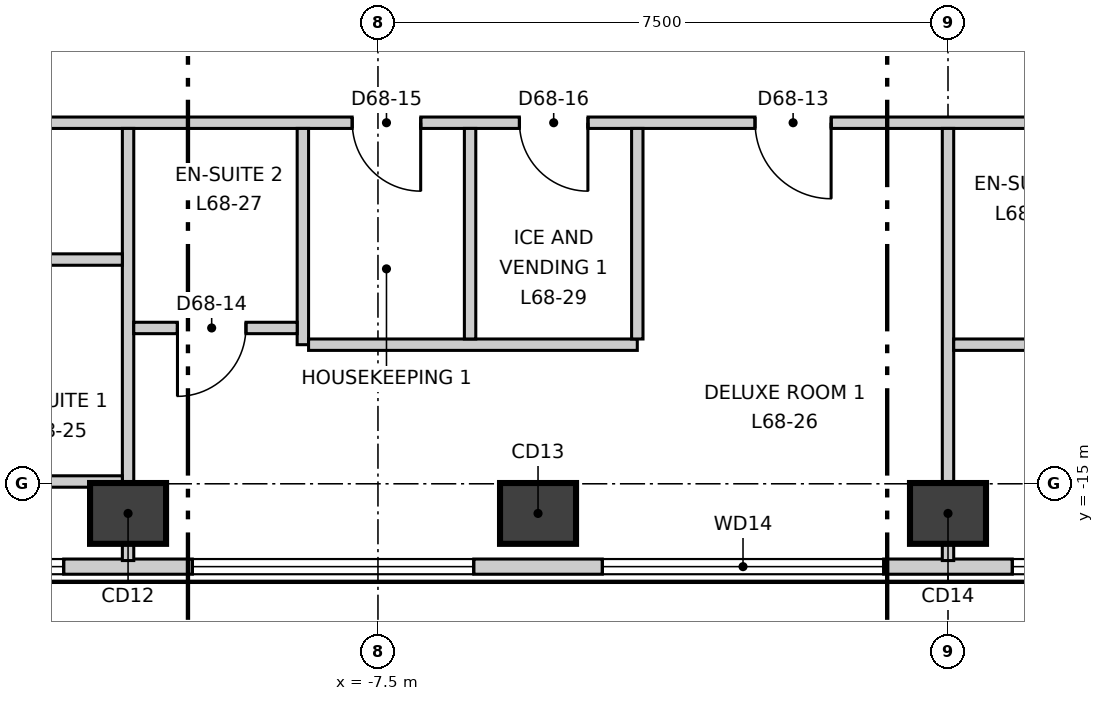
"""IFC4 building model, lengths in metres.
Left out: names, types, materials, properties, quantities, classifications, styles, units other than length and angle.
Written with IfcOpenShell. Run it as: python <this file> out.ifc"""

import sys

from ifc_helpers import new_model, si_unit, direction, frame, frame_2d, origin, origin_2d, place, context, subcontext, project, spatial, rectangle, extrude, element, fill, save


model = new_model("IFC4")
c1 = context("Model", 3, precision=1e-05, world=origin(), true_north=direction((0.0, 1.0)))
c2 = subcontext(c1, "Body", "Model", "MODEL_VIEW")
j1 = project(units=[si_unit("LENGTHUNIT", "METRE"), si_unit("PLANEANGLEUNIT", "RADIAN")], contexts=[c1])
p1 = place(None, origin())
s1 = spatial("IfcSite", under=j1, at=p1, CompositionType="ELEMENT")
p2 = place(p1, origin())
s2 = spatial("IfcBuilding", under=s1, at=p2, CompositionType="ELEMENT")
p3 = place(p2, frame((0.0, 0.0, 289.9)))
s3 = spatial("IfcBuildingStorey", under=s2, at=p3, CompositionType="ELEMENT", Elevation=289.9)
for number, where, z_axis, x_axis in (
    (1, (-10.788, -15.39, -0.3), (0.0, 0.0, 1.0), (1.0, 0.0, 0.0)),
    (2, (-5.394, -15.39, -0.3), (0.0, 0.0, 1.0), (1.0, 0.0, 0.0)),
    (3, (0.0, -15.39, -0.3), (0.0, 0.0, 1.0), (1.0, 0.0, 0.0)),
):
    element("IfcColumn", number, at=place(p3, frame(where, z_axis=z_axis, x_axis=x_axis)), inside=s3, PredefinedType="COLUMN", context=c2, shape_type="SweptSolid", body=[
        extrude(rectangle(XDim=1.0, YDim=0.8, at=origin_2d()), origin(), (0.0, 0.0, 1.0), 3.6),
    ])
p4 = place(p3, frame((-2.494, 27.86, 0.0), z_axis=(0.0, 0.0, 1.0), x_axis=(-0.500008134474, -0.866020707292, 0.0)))
e4 = element("IfcWall", 4, at=p4, inside=s3, PredefinedType="ELEMENTEDWALL", context=c2, shape_type="SweptSolid", body=[
    extrude(rectangle(XDim=45.741, YDim=0.2, at=frame_2d((22.871, 0.0))), origin(), (0.0, 0.0, 1.0), 3.3),
])
p5 = place(p4, frame((2.15, 0.0, 0.9)))
e5 = element("IfcOpeningElement", 5, at=p5, cuts=e4, PredefinedType="OPENING", context=c2, shape_type="SweptSolid", body=[
    extrude(rectangle(XDim=3.7, YDim=2.2, at=frame_2d((1.85, 1.1))), frame((0.0, 0.11, 0.0), z_axis=(0.0, -1.0, 0.0), x_axis=(1.0, 0.0, 0.0)), (0.0, 0.0, 1.0), 0.22),
])
p6 = place(p4, frame((7.544, 0.0, 0.9)))
e6 = element("IfcOpeningElement", 6, at=p6, cuts=e4, PredefinedType="OPENING", context=c2, shape_type="SweptSolid", body=[
    extrude(rectangle(XDim=3.7, YDim=2.2, at=frame_2d((1.85, 1.1))), frame((0.0, 0.11, 0.0), z_axis=(0.0, -1.0, 0.0), x_axis=(1.0, 0.0, 0.0)), (0.0, 0.0, 1.0), 0.22),
])
p7 = place(p4, frame((12.939, 0.0, 0.9)))
e7 = element("IfcOpeningElement", 7, at=p7, cuts=e4, PredefinedType="OPENING", context=c2, shape_type="SweptSolid", body=[
    extrude(rectangle(XDim=3.7, YDim=2.2, at=frame_2d((1.85, 1.1))), frame((0.0, 0.11, 0.0), z_axis=(0.0, -1.0, 0.0), x_axis=(1.0, 0.0, 0.0)), (0.0, 0.0, 1.0), 0.22),
])
p8 = place(p4, frame((18.333, 0.0, 0.9)))
e8 = element("IfcOpeningElement", 8, at=p8, cuts=e4, PredefinedType="OPENING", context=c2, shape_type="SweptSolid", body=[
    extrude(rectangle(XDim=3.7, YDim=2.2, at=frame_2d((1.85, 1.1))), frame((0.0, 0.11, 0.0), z_axis=(0.0, -1.0, 0.0), x_axis=(1.0, 0.0, 0.0)), (0.0, 0.0, 1.0), 0.22),
])
p9 = place(p4, frame((23.728, 0.0, 0.9)))
e9 = element("IfcOpeningElement", 9, at=p9, cuts=e4, PredefinedType="OPENING", context=c2, shape_type="SweptSolid", body=[
    extrude(rectangle(XDim=3.7, YDim=2.2, at=frame_2d((1.85, 1.1))), frame((0.0, 0.11, 0.0), z_axis=(0.0, -1.0, 0.0), x_axis=(1.0, 0.0, 0.0)), (0.0, 0.0, 1.0), 0.22),
])
p10 = place(p4, frame((29.122, 0.0, 0.9)))
e10 = element("IfcOpeningElement", 10, at=p10, cuts=e4, PredefinedType="OPENING", context=c2, shape_type="SweptSolid", body=[
    extrude(rectangle(XDim=3.7, YDim=2.2, at=frame_2d((1.85, 1.1))), frame((0.0, 0.11, 0.0), z_axis=(0.0, -1.0, 0.0), x_axis=(1.0, 0.0, 0.0)), (0.0, 0.0, 1.0), 0.22),
])
p11 = place(p4, frame((34.517, 0.0, 0.9)))
e11 = element("IfcOpeningElement", 11, at=p11, cuts=e4, PredefinedType="OPENING", context=c2, shape_type="SweptSolid", body=[
    extrude(rectangle(XDim=3.7, YDim=2.2, at=frame_2d((1.85, 1.1))), frame((0.0, 0.11, 0.0), z_axis=(0.0, -1.0, 0.0), x_axis=(1.0, 0.0, 0.0)), (0.0, 0.0, 1.0), 0.22),
])
p12 = place(p4, frame((39.911, 0.0, 0.9)))
e12 = element("IfcOpeningElement", 12, at=p12, cuts=e4, PredefinedType="OPENING", context=c2, shape_type="SweptSolid", body=[
    extrude(rectangle(XDim=3.7, YDim=2.2, at=frame_2d((1.85, 1.1))), frame((0.0, 0.11, 0.0), z_axis=(0.0, -1.0, 0.0), x_axis=(1.0, 0.0, 0.0)), (0.0, 0.0, 1.0), 0.22),
])
p13 = place(p3, frame((-22.88, -16.09, 0.0), z_axis=(0.0, 0.0, 1.0), x_axis=(1.0, 0.0, 0.0)))
e13 = element("IfcWall", 13, at=p13, inside=s3, PredefinedType="ELEMENTEDWALL", context=c2, shape_type="SweptSolid", body=[
    extrude(rectangle(XDim=45.74, YDim=0.2, at=frame_2d((22.87, 0.0))), origin(), (0.0, 0.0, 1.0), 3.3),
])
p14 = place(p13, frame((2.15, 0.0, 0.9)))
e14 = element("IfcOpeningElement", 14, at=p14, cuts=e13, PredefinedType="OPENING", context=c2, shape_type="SweptSolid", body=[
    extrude(rectangle(XDim=3.7, YDim=2.2, at=frame_2d((1.85, 1.1))), frame((0.0, 0.11, 0.0), z_axis=(0.0, -1.0, 0.0), x_axis=(1.0, 0.0, 0.0)), (0.0, 0.0, 1.0), 0.22),
])
p15 = place(p13, frame((7.544, 0.0, 0.9)))
e15 = element("IfcOpeningElement", 15, at=p15, cuts=e13, PredefinedType="OPENING", context=c2, shape_type="SweptSolid", body=[
    extrude(rectangle(XDim=3.7, YDim=2.2, at=frame_2d((1.85, 1.1))), frame((0.0, 0.11, 0.0), z_axis=(0.0, -1.0, 0.0), x_axis=(1.0, 0.0, 0.0)), (0.0, 0.0, 1.0), 0.22),
])
p16 = place(p13, frame((12.939, 0.0, 0.9)))
e16 = element("IfcOpeningElement", 16, at=p16, cuts=e13, PredefinedType="OPENING", context=c2, shape_type="SweptSolid", body=[
    extrude(rectangle(XDim=3.7, YDim=2.2, at=frame_2d((1.85, 1.1))), frame((0.0, 0.11, 0.0), z_axis=(0.0, -1.0, 0.0), x_axis=(1.0, 0.0, 0.0)), (0.0, 0.0, 1.0), 0.22),
])
p17 = place(p13, frame((18.333, 0.0, 0.9)))
e17 = element("IfcOpeningElement", 17, at=p17, cuts=e13, PredefinedType="OPENING", context=c2, shape_type="SweptSolid", body=[
    extrude(rectangle(XDim=3.7, YDim=2.2, at=frame_2d((1.85, 1.1))), frame((0.0, 0.11, 0.0), z_axis=(0.0, -1.0, 0.0), x_axis=(1.0, 0.0, 0.0)), (0.0, 0.0, 1.0), 0.22),
])
p18 = place(p13, frame((23.727, 0.0, 0.9)))
e18 = element("IfcOpeningElement", 18, at=p18, cuts=e13, PredefinedType="OPENING", context=c2, shape_type="SweptSolid", body=[
    extrude(rectangle(XDim=3.7, YDim=2.2, at=frame_2d((1.85, 1.1))), frame((0.0, 0.11, 0.0), z_axis=(0.0, -1.0, 0.0), x_axis=(1.0, 0.0, 0.0)), (0.0, 0.0, 1.0), 0.22),
])
p19 = place(p13, frame((29.121, 0.0, 0.9)))
e19 = element("IfcOpeningElement", 19, at=p19, cuts=e13, PredefinedType="OPENING", context=c2, shape_type="SweptSolid", body=[
    extrude(rectangle(XDim=3.7, YDim=2.2, at=frame_2d((1.85, 1.1))), frame((0.0, 0.11, 0.0), z_axis=(0.0, -1.0, 0.0), x_axis=(1.0, 0.0, 0.0)), (0.0, 0.0, 1.0), 0.22),
])
p20 = place(p13, frame((34.516, 0.0, 0.9)))
e20 = element("IfcOpeningElement", 20, at=p20, cuts=e13, PredefinedType="OPENING", context=c2, shape_type="SweptSolid", body=[
    extrude(rectangle(XDim=3.7, YDim=2.2, at=frame_2d((1.85, 1.1))), frame((0.0, 0.11, 0.0), z_axis=(0.0, -1.0, 0.0), x_axis=(1.0, 0.0, 0.0)), (0.0, 0.0, 1.0), 0.22),
])
p21 = place(p13, frame((39.91, 0.0, 0.9)))
e21 = element("IfcOpeningElement", 21, at=p21, cuts=e13, PredefinedType="OPENING", context=c2, shape_type="SweptSolid", body=[
    extrude(rectangle(XDim=3.7, YDim=2.2, at=frame_2d((1.85, 1.1))), frame((0.0, 0.11, 0.0), z_axis=(0.0, -1.0, 0.0), x_axis=(1.0, 0.0, 0.0)), (0.0, 0.0, 1.0), 0.22),
])
p22 = place(p3, frame((-17.603, -10.25, 0.0), z_axis=(0.0, 0.0, 1.0), x_axis=(1.0, 0.0, 0.0)))
e22 = element("IfcWall", 22, at=p22, inside=s3, PredefinedType="PARTITIONING", context=c2, shape_type="SweptSolid", body=[
    extrude(rectangle(XDim=35.356, YDim=0.15, at=frame_2d((17.678, 0.0))), origin(), (0.0, 0.0, 1.0), 3.3),
])
p23 = place(p22, frame((2.8, 0.0, 0.0)))
e23 = element("IfcOpeningElement", 23, at=p23, cuts=e22, PredefinedType="OPENING", context=c2, shape_type="SweptSolid", body=[
    extrude(rectangle(XDim=1.0, YDim=2.1, at=frame_2d((0.5, 1.05))), frame((0.0, 0.085, 0.0), z_axis=(0.0, -1.0, 0.0), x_axis=(1.0, 0.0, 0.0)), (0.0, 0.0, 1.0), 0.17),
])
p24 = place(p22, frame((15.065, 0.0, 0.0)))
e24 = element("IfcOpeningElement", 24, at=p24, cuts=e22, PredefinedType="OPENING", context=c2, shape_type="SweptSolid", body=[
    extrude(rectangle(XDim=1.0, YDim=2.1, at=frame_2d((0.5, 1.05))), frame((0.0, 0.085, 0.0), z_axis=(0.0, -1.0, 0.0), x_axis=(1.0, 0.0, 0.0)), (0.0, 0.0, 1.0), 0.17),
])
p25 = place(p22, frame((9.765, 0.0, 0.0)))
e25 = element("IfcOpeningElement", 25, at=p25, cuts=e22, PredefinedType="OPENING", context=c2, shape_type="SweptSolid", body=[
    extrude(rectangle(XDim=0.9, YDim=2.1, at=frame_2d((0.45, 1.05))), frame((0.0, 0.085, 0.0), z_axis=(0.0, -1.0, 0.0), x_axis=(1.0, 0.0, 0.0)), (0.0, 0.0, 1.0), 0.17),
])
p26 = place(p22, frame((11.965, 0.0, 0.0)))
e26 = element("IfcOpeningElement", 26, at=p26, cuts=e22, PredefinedType="OPENING", context=c2, shape_type="SweptSolid", body=[
    extrude(rectangle(XDim=0.9, YDim=2.1, at=frame_2d((0.45, 1.05))), frame((0.0, 0.085, 0.0), z_axis=(0.0, -1.0, 0.0), x_axis=(1.0, 0.0, 0.0)), (0.0, 0.0, 1.0), 0.17),
])
p27 = place(p22, frame((20.953, 0.0, 0.0)))
e27 = element("IfcOpeningElement", 27, at=p27, cuts=e22, PredefinedType="OPENING", context=c2, shape_type="SweptSolid", body=[
    extrude(rectangle(XDim=1.0, YDim=2.1, at=frame_2d((0.5, 1.05))), frame((0.0, 0.085, 0.0), z_axis=(0.0, -1.0, 0.0), x_axis=(1.0, 0.0, 0.0)), (0.0, 0.0, 1.0), 0.17),
])
p28 = place(p22, frame((26.347, 0.0, 0.0)))
e28 = element("IfcOpeningElement", 28, at=p28, cuts=e22, PredefinedType="OPENING", context=c2, shape_type="SweptSolid", body=[
    extrude(rectangle(XDim=1.0, YDim=2.1, at=frame_2d((0.5, 1.05))), frame((0.0, 0.085, 0.0), z_axis=(0.0, -1.0, 0.0), x_axis=(1.0, 0.0, 0.0)), (0.0, 0.0, 1.0), 0.17),
])
p29 = place(p22, frame((31.342, 0.0, 0.0)))
e29 = element("IfcOpeningElement", 29, at=p29, cuts=e22, PredefinedType="OPENING", context=c2, shape_type="SweptSolid", body=[
    extrude(rectangle(XDim=1.0, YDim=2.1, at=frame_2d((0.5, 1.05))), frame((0.0, 0.085, 0.0), z_axis=(0.0, -1.0, 0.0), x_axis=(1.0, 0.0, 0.0)), (0.0, 0.0, 1.0), 0.17),
])
p30 = place(p3, frame((-17.679, -10.12, 0.0), z_axis=(0.0, 0.0, 1.0), x_axis=(0.500008955215, 0.866020233427, 0.0)))
e30 = element("IfcWall", 30, at=p30, inside=s3, PredefinedType="PARTITIONING", context=c2, shape_type="SweptSolid", body=[
    extrude(rectangle(XDim=35.357, YDim=0.15, at=frame_2d((17.679, 0.0))), origin(), (0.0, 0.0, 1.0), 3.3),
])
p31 = place(p30, frame((31.407, 0.0, 0.0)))
e31 = element("IfcOpeningElement", 31, at=p31, cuts=e30, PredefinedType="OPENING", context=c2, shape_type="SweptSolid", body=[
    extrude(rectangle(XDim=1.0, YDim=2.1, at=frame_2d((0.5, 1.05))), frame((0.0, 0.085, 0.0), z_axis=(0.0, -1.0, 0.0), x_axis=(1.0, 0.0, 0.0)), (0.0, 0.0, 1.0), 0.17),
])
p32 = place(p30, frame((25.642, 0.0, 0.0)))
e32 = element("IfcOpeningElement", 32, at=p32, cuts=e30, PredefinedType="OPENING", context=c2, shape_type="SweptSolid", body=[
    extrude(rectangle(XDim=1.0, YDim=2.1, at=frame_2d((0.5, 1.05))), frame((0.0, 0.085, 0.0), z_axis=(0.0, -1.0, 0.0), x_axis=(1.0, 0.0, 0.0)), (0.0, 0.0, 1.0), 0.17),
])
p33 = place(p30, frame((18.348, 0.0, 0.0)))
e33 = element("IfcOpeningElement", 33, at=p33, cuts=e30, PredefinedType="OPENING", context=c2, shape_type="SweptSolid", body=[
    extrude(rectangle(XDim=1.0, YDim=2.1, at=frame_2d((0.5, 1.05))), frame((0.0, 0.085, 0.0), z_axis=(0.0, -1.0, 0.0), x_axis=(1.0, 0.0, 0.0)), (0.0, 0.0, 1.0), 0.17),
])
p34 = place(p30, frame((13.254, 0.0, 0.0)))
e34 = element("IfcOpeningElement", 34, at=p34, cuts=e30, PredefinedType="OPENING", context=c2, shape_type="SweptSolid", body=[
    extrude(rectangle(XDim=1.0, YDim=2.1, at=frame_2d((0.5, 1.05))), frame((0.0, 0.085, 0.0), z_axis=(0.0, -1.0, 0.0), x_axis=(1.0, 0.0, 0.0)), (0.0, 0.0, 1.0), 0.17),
])
p35 = place(p30, frame((7.559, 0.0, 0.0)))
e35 = element("IfcOpeningElement", 35, at=p35, cuts=e30, PredefinedType="OPENING", context=c2, shape_type="SweptSolid", body=[
    extrude(rectangle(XDim=1.0, YDim=2.1, at=frame_2d((0.5, 1.05))), frame((0.0, 0.085, 0.0), z_axis=(0.0, -1.0, 0.0), x_axis=(1.0, 0.0, 0.0)), (0.0, 0.0, 1.0), 0.17),
])
p36 = place(p30, frame((2.865, 0.0, 0.0)))
e36 = element("IfcOpeningElement", 36, at=p36, cuts=e30, PredefinedType="OPENING", context=c2, shape_type="SweptSolid", body=[
    extrude(rectangle(XDim=1.0, YDim=2.1, at=frame_2d((0.5, 1.05))), frame((0.0, 0.085, 0.0), z_axis=(0.0, -1.0, 0.0), x_axis=(1.0, 0.0, 0.0)), (0.0, 0.0, 1.0), 0.17),
])
p37 = place(p3, frame((-10.788, -16.01, 0.0), z_axis=(0.0, 0.0, 1.0), x_axis=(0.0, 1.0, 0.0)))
e37 = element("IfcWall", 37, at=p37, inside=s3, PredefinedType="PARTITIONING", context=c2, shape_type="SweptSolid", body=[
    extrude(rectangle(XDim=5.685, YDim=0.15, at=frame_2d((2.843, 0.0))), origin(), (0.0, 0.0, 1.0), 3.3),
])
p38 = place(p3, frame((-8.488, -13.17, 0.0), z_axis=(0.0, 0.0, 1.0), x_axis=(0.0, 1.0, 0.0)))
e38 = element("IfcWall", 38, at=p38, inside=s3, PredefinedType="PARTITIONING", context=c2, shape_type="SweptSolid", body=[
    extrude(rectangle(XDim=2.845, YDim=0.15, at=frame_2d((1.422, 0.0))), origin(), (0.0, 0.0, 1.0), 3.3),
])
p39 = place(p3, frame((-8.413, -13.17, 0.0), z_axis=(0.0, 0.0, 1.0), x_axis=(1.0, 0.0, 0.0)))
e39 = element("IfcWall", 39, at=p39, inside=s3, PredefinedType="PARTITIONING", context=c2, shape_type="SweptSolid", body=[
    extrude(rectangle(XDim=4.325, YDim=0.15, at=frame_2d((2.163, 0.0))), origin(), (0.0, 0.0, 1.0), 3.3),
])
for number, where, z_axis, x_axis in (
    (40, (-4.088, -13.095, 0.0), (0.0, 0.0, 1.0), (0.0, 1.0, 0.0)),
    (41, (-6.288, -13.095, 0.0), (0.0, 0.0, 1.0), (0.0, 1.0, 0.0)),
):
    element("IfcWall", number, at=place(p3, frame(where, z_axis=z_axis, x_axis=x_axis)), inside=s3, PredefinedType="PARTITIONING", context=c2, shape_type="SweptSolid", body=[
        extrude(rectangle(XDim=2.77, YDim=0.15, at=frame_2d((1.385, 0.0))), origin(), (0.0, 0.0, 1.0), 3.3),
    ])
p40 = place(p3, frame((0.0, -16.01, 0.0), z_axis=(0.0, 0.0, 1.0), x_axis=(0.0, 1.0, 0.0)))
e42 = element("IfcWall", 42, at=p40, inside=s3, PredefinedType="PARTITIONING", context=c2, shape_type="SweptSolid", body=[
    extrude(rectangle(XDim=5.685, YDim=0.15, at=frame_2d((2.843, 0.0))), origin(), (0.0, 0.0, 1.0), 2.8),
])
p41 = place(p3, frame((0.075, 20.37, 0.0), z_axis=(0.0, 0.0, 1.0), x_axis=(0.500009775255, -0.866019759965, 0.0)))
e43 = element("IfcWall", 43, at=p41, inside=s3, PredefinedType="PARTITIONING", context=c2, shape_type="SweptSolid", body=[
    extrude(rectangle(XDim=35.207, YDim=0.15, at=frame_2d((17.604, 0.0))), origin(), (0.0, 0.0, 1.0), 3.3),
])
p42 = place(p41, frame((31.407, 0.0, 0.0)))
e44 = element("IfcOpeningElement", 44, at=p42, cuts=e43, PredefinedType="OPENING", context=c2, shape_type="SweptSolid", body=[
    extrude(rectangle(XDim=1.0, YDim=2.1, at=frame_2d((0.5, 1.05))), frame((0.0, 0.085, 0.0), z_axis=(0.0, -1.0, 0.0), x_axis=(1.0, 0.0, 0.0)), (0.0, 0.0, 1.0), 0.17),
])
p43 = place(p41, frame((19.243, 0.0, 0.0)))
e45 = element("IfcOpeningElement", 45, at=p43, cuts=e43, PredefinedType="OPENING", context=c2, shape_type="SweptSolid", body=[
    extrude(rectangle(XDim=1.0, YDim=2.1, at=frame_2d((0.5, 1.05))), frame((0.0, 0.085, 0.0), z_axis=(0.0, -1.0, 0.0), x_axis=(1.0, 0.0, 0.0)), (0.0, 0.0, 1.0), 0.17),
])
p44 = place(p41, frame((24.543, 0.0, 0.0)))
e46 = element("IfcOpeningElement", 46, at=p44, cuts=e43, PredefinedType="OPENING", context=c2, shape_type="SweptSolid", body=[
    extrude(rectangle(XDim=0.9, YDim=2.1, at=frame_2d((0.45, 1.05))), frame((0.0, 0.085, 0.0), z_axis=(0.0, -1.0, 0.0), x_axis=(1.0, 0.0, 0.0)), (0.0, 0.0, 1.0), 0.17),
])
p45 = place(p41, frame((22.443, 0.0, 0.0)))
e47 = element("IfcOpeningElement", 47, at=p45, cuts=e43, PredefinedType="OPENING", context=c2, shape_type="SweptSolid", body=[
    extrude(rectangle(XDim=0.9, YDim=2.1, at=frame_2d((0.45, 1.05))), frame((0.0, 0.085, 0.0), z_axis=(0.0, -1.0, 0.0), x_axis=(1.0, 0.0, 0.0)), (0.0, 0.0, 1.0), 0.17),
])
p46 = place(p41, frame((13.253, 0.0, 0.0)))
e48 = element("IfcOpeningElement", 48, at=p46, cuts=e43, PredefinedType="OPENING", context=c2, shape_type="SweptSolid", body=[
    extrude(rectangle(XDim=1.0, YDim=2.1, at=frame_2d((0.5, 1.05))), frame((0.0, 0.085, 0.0), z_axis=(0.0, -1.0, 0.0), x_axis=(1.0, 0.0, 0.0)), (0.0, 0.0, 1.0), 0.17),
])
p47 = place(p41, frame((5.559, 0.0, 0.0)))
e49 = element("IfcOpeningElement", 49, at=p47, cuts=e43, PredefinedType="OPENING", context=c2, shape_type="SweptSolid", body=[
    extrude(rectangle(XDim=1.0, YDim=2.1, at=frame_2d((0.5, 1.05))), frame((0.0, 0.085, 0.0), z_axis=(0.0, -1.0, 0.0), x_axis=(1.0, 0.0, 0.0)), (0.0, 0.0, 1.0), 0.17),
])
p48 = place(p3, frame((-13.388, -12.05, 0.0), z_axis=(0.0, 0.0, 1.0), x_axis=(1.0, 0.0, 0.0)))
e50 = element("IfcWall", 50, at=p48, inside=s3, PredefinedType="PARTITIONING", context=c2, shape_type="SweptSolid", body=[
    extrude(rectangle(XDim=2.525, YDim=0.15, at=frame_2d((1.262, 0.0))), origin(), (0.0, 0.0, 1.0), 3.3),
])
p49 = place(p3, frame((-13.313, -14.97, 0.0), z_axis=(0.0, 0.0, 1.0), x_axis=(1.0, 0.0, 0.0)))
e51 = element("IfcWall", 51, at=p49, inside=s3, PredefinedType="PARTITIONING", context=c2, shape_type="SweptSolid", body=[
    extrude(rectangle(XDim=2.45, YDim=0.15, at=frame_2d((1.225, 0.0))), origin(), (0.0, 0.0, 1.0), 2.6),
])
p50 = place(p3, frame((-10.713, -12.95, 0.0), z_axis=(0.0, 0.0, 1.0), x_axis=(1.0, 0.0, 0.0)))
e52 = element("IfcWall", 52, at=p50, inside=s3, PredefinedType="PARTITIONING", context=c2, shape_type="SweptSolid", body=[
    extrude(rectangle(XDim=2.15, YDim=0.15, at=frame_2d((1.075, 0.0))), origin(), (0.0, 0.0, 1.0), 3.3),
])
p51 = place(p50, frame((0.575, 0.0, 0.0)))
e53 = element("IfcOpeningElement", 53, at=p51, cuts=e52, PredefinedType="OPENING", context=c2, shape_type="SweptSolid", body=[
    extrude(rectangle(XDim=0.9, YDim=2.1, at=frame_2d((0.45, 1.05))), frame((0.0, 0.085, 0.0), z_axis=(0.0, -1.0, 0.0), x_axis=(1.0, 0.0, 0.0)), (0.0, 0.0, 1.0), 0.17),
])
p52 = place(p3, frame((0.075, -13.17, 0.0), z_axis=(0.0, 0.0, 1.0), x_axis=(1.0, 0.0, 0.0)))
e54 = element("IfcWall", 54, at=p52, inside=s3, PredefinedType="PARTITIONING", context=c2, shape_type="SweptSolid", body=[
    extrude(rectangle(XDim=2.925, YDim=0.15, at=frame_2d((1.462, 0.0))), origin(), (0.0, 0.0, 1.0), 3.3),
])
p53 = place(p52, frame((0.975, 0.0, 0.0)))
e55 = element("IfcOpeningElement", 55, at=p53, cuts=e54, PredefinedType="OPENING", context=c2, shape_type="SweptSolid", body=[
    extrude(rectangle(XDim=0.9, YDim=2.1, at=frame_2d((0.45, 1.05))), frame((0.0, 0.085, 0.0), z_axis=(0.0, -1.0, 0.0), x_axis=(1.0, 0.0, 0.0)), (0.0, 0.0, 1.0), 0.17),
])
p54 = place(p15, origin())
e56 = element("IfcWindow", 56, at=p54, inside=s3, PartitioningType="SINGLE_PANEL", PredefinedType="WINDOW", context=c2, shape_type="SweptSolid", body=[
    extrude(rectangle(XDim=3.7, YDim=2.2, at=frame_2d((1.85, 1.1))), frame((0.0, 0.03, 0.0), z_axis=(0.0, -1.0, 0.0), x_axis=(1.0, 0.0, 0.0)), (0.0, 0.0, 1.0), 0.06),
])
fill(e15, e56)
p55 = place(p16, origin())
e57 = element("IfcWindow", 57, at=p55, inside=s3, PartitioningType="SINGLE_PANEL", PredefinedType="WINDOW", context=c2, shape_type="SweptSolid", body=[
    extrude(rectangle(XDim=3.7, YDim=2.2, at=frame_2d((1.85, 1.1))), frame((0.0, 0.03, 0.0), z_axis=(0.0, -1.0, 0.0), x_axis=(1.0, 0.0, 0.0)), (0.0, 0.0, 1.0), 0.06),
])
fill(e16, e57)
p56 = place(p17, origin())
e58 = element("IfcWindow", 58, at=p56, inside=s3, PartitioningType="SINGLE_PANEL", PredefinedType="WINDOW", context=c2, shape_type="SweptSolid", body=[
    extrude(rectangle(XDim=3.7, YDim=2.2, at=frame_2d((1.85, 1.1))), frame((0.0, 0.03, 0.0), z_axis=(0.0, -1.0, 0.0), x_axis=(1.0, 0.0, 0.0)), (0.0, 0.0, 1.0), 0.06),
])
fill(e17, e58)
p57 = place(p18, origin())
e59 = element("IfcWindow", 59, at=p57, inside=s3, PartitioningType="SINGLE_PANEL", PredefinedType="WINDOW", context=c2, shape_type="SweptSolid", body=[
    extrude(rectangle(XDim=3.7, YDim=2.2, at=frame_2d((1.85, 1.1))), frame((0.0, 0.03, 0.0), z_axis=(0.0, -1.0, 0.0), x_axis=(1.0, 0.0, 0.0)), (0.0, 0.0, 1.0), 0.06),
])
fill(e18, e59)
p58 = place(p24, origin())
e60 = element("IfcDoor", 60, at=p58, inside=s3, OperationType="SINGLE_SWING_RIGHT", PredefinedType="DOOR", context=c2, shape_type="SweptSolid", body=[
    extrude(rectangle(XDim=1.0, YDim=2.1, at=frame_2d((0.5, 1.05))), frame((0.0, 0.025, 0.0), z_axis=(0.0, -1.0, 0.0), x_axis=(1.0, 0.0, 0.0)), (0.0, 0.0, 1.0), 0.05),
])
fill(e24, e60)
p59 = place(p51, origin())
e61 = element("IfcDoor", 61, at=p59, inside=s3, OperationType="SINGLE_SWING_LEFT", PredefinedType="DOOR", context=c2, shape_type="SweptSolid", body=[
    extrude(rectangle(XDim=0.9, YDim=2.1, at=frame_2d((0.45, 1.05))), frame((0.0, 0.025, 0.0), z_axis=(0.0, -1.0, 0.0), x_axis=(1.0, 0.0, 0.0)), (0.0, 0.0, 1.0), 0.05),
])
fill(e53, e61)
p60 = place(p25, origin())
e62 = element("IfcDoor", 62, at=p60, inside=s3, OperationType="SINGLE_SWING_RIGHT", PredefinedType="DOOR", context=c2, shape_type="SweptSolid", body=[
    extrude(rectangle(XDim=0.9, YDim=2.1, at=frame_2d((0.45, 1.05))), frame((0.0, 0.025, 0.0), z_axis=(0.0, -1.0, 0.0), x_axis=(1.0, 0.0, 0.0)), (0.0, 0.0, 1.0), 0.05),
])
fill(e25, e62)
p61 = place(p26, origin())
e63 = element("IfcDoor", 63, at=p61, inside=s3, OperationType="SINGLE_SWING_RIGHT", PredefinedType="DOOR", context=c2, shape_type="SweptSolid", body=[
    extrude(rectangle(XDim=0.9, YDim=2.1, at=frame_2d((0.45, 1.05))), frame((0.0, 0.025, 0.0), z_axis=(0.0, -1.0, 0.0), x_axis=(1.0, 0.0, 0.0)), (0.0, 0.0, 1.0), 0.05),
])
fill(e26, e63)
save(model, sys.argv[1])
